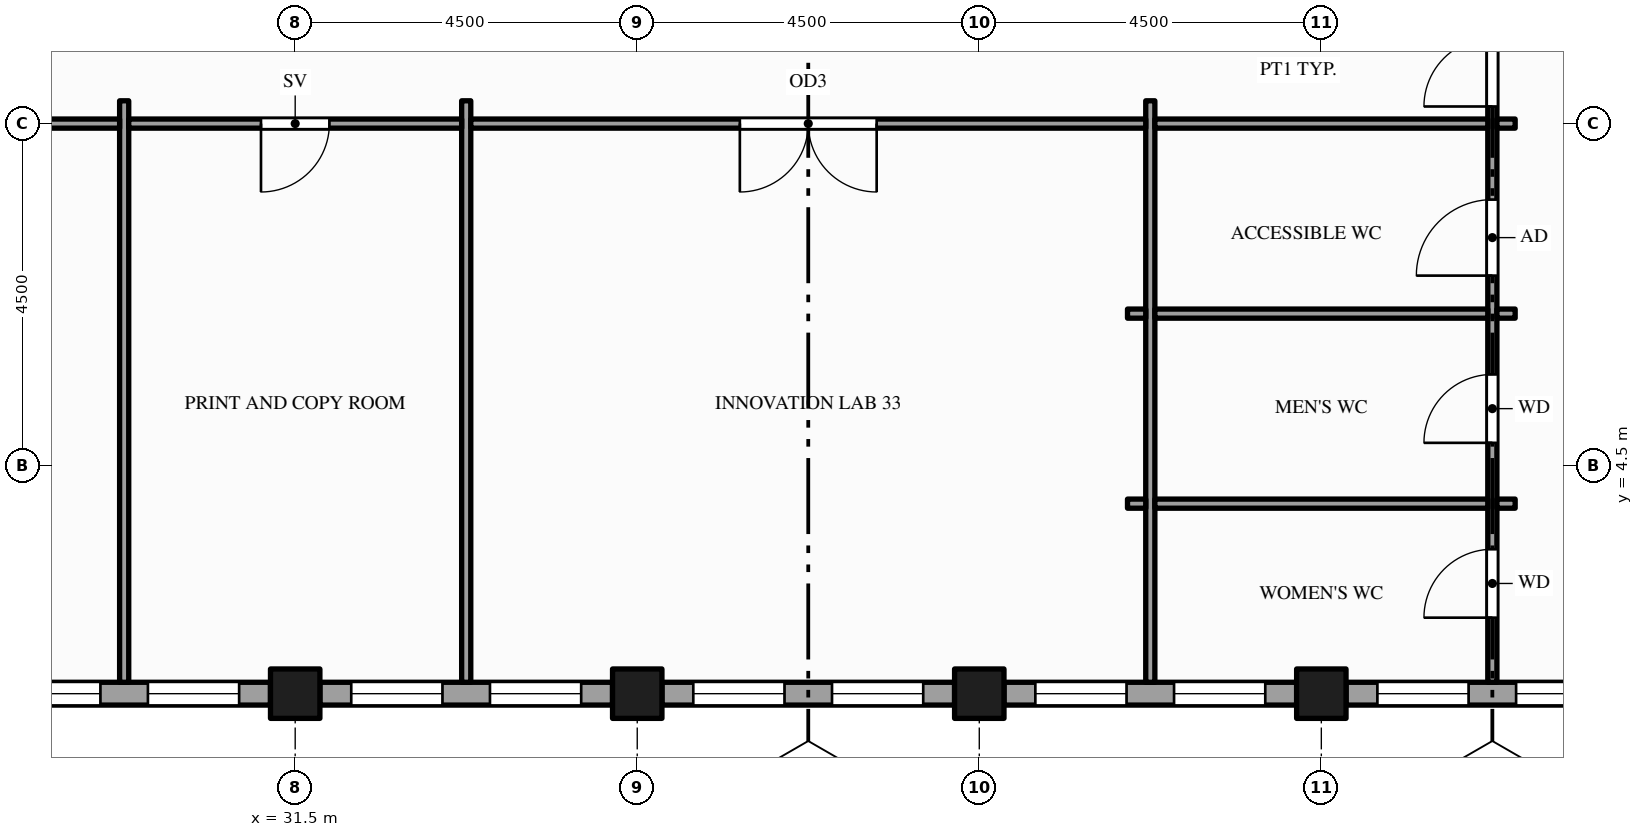
"""IFC4 building model, lengths in metres.
Left out: names, types, materials, properties, quantities, classifications, styles, units other than length and angle.
Written with IfcOpenShell. Run it as: python <this file> out.ifc"""

import sys

from ifc_helpers import new_model, si_unit, direction, frame, frame_2d, origin, origin_2d, place, context, subcontext, project, spatial, rectangle, hollow_rectangle, extrude, element, fill, save


model = new_model("IFC4")
c1 = context("Model", 3, precision=1e-05, world=origin(), true_north=direction((0.0, 1.0)))
c2 = subcontext(c1, "Body", "Model", "MODEL_VIEW")
j1 = project(units=[si_unit("LENGTHUNIT", "METRE"), si_unit("PLANEANGLEUNIT", "RADIAN")], contexts=[c1])
p1 = place(None, origin())
s1 = spatial("IfcSite", under=j1, at=p1, CompositionType="ELEMENT")
p2 = place(p1, origin())
s2 = spatial("IfcBuilding", under=s1, at=p2, CompositionType="ELEMENT")
p3 = place(p2, frame((0.0, 0.0, 289.0)))
s3 = spatial("IfcBuildingStorey", under=s2, at=p3, CompositionType="ELEMENT", Elevation=289.0)
for number, where, z_axis, x_axis in (
    (1, (31.5, 1.5, -0.15), (0.0, 0.0, 1.0), (1.0, 0.0, 0.0)),
    (2, (36.0, 1.5, -0.15), (0.0, 0.0, 1.0), (1.0, 0.0, 0.0)),
    (3, (40.5, 1.5, -0.15), (0.0, 0.0, 1.0), (1.0, 0.0, 0.0)),
    (4, (45.0, 1.5, -0.15), (0.0, 0.0, 1.0), (1.0, 0.0, 0.0)),
):
    element("IfcColumn", number, at=place(p3, frame(where, z_axis=z_axis, x_axis=x_axis)), inside=s3, PredefinedType="COLUMN", context=c2, shape_type="SweptSolid", body=[
        extrude(hollow_rectangle(XDim=0.65, YDim=0.65, WallThickness=0.032, at=origin_2d()), origin(), (0.0, 0.0, 1.0), 4.0),
    ])
p4 = place(p3, frame((27.325, 1.5, 0.0), z_axis=(0.0, 0.0, 1.0), x_axis=(1.0, 0.0, 0.0)))
e5 = element("IfcWall", 5, at=p4, inside=s3, PredefinedType="STANDARD", context=c2, shape_type="SweptSolid", body=[
    extrude(rectangle(XDim=3.85, YDim=0.3, at=frame_2d((1.925, 0.0))), origin(), (0.0, 0.0, 1.0), 2.87),
])
p5 = place(p4, frame((0.413, 0.0, 0.9)))
e6 = element("IfcOpeningElement", 6, at=p5, cuts=e5, PredefinedType="OPENING", context=c2, shape_type="SweptSolid", body=[
    extrude(rectangle(XDim=1.2, YDim=1.75, at=frame_2d((0.6, 0.875))), frame((0.0, 0.16, 0.0), z_axis=(0.0, -1.0, 0.0), x_axis=(1.0, 0.0, 0.0)), (0.0, 0.0, 1.0), 0.32),
])
p6 = place(p4, frame((2.238, 0.0, 0.9)))
e7 = element("IfcOpeningElement", 7, at=p6, cuts=e5, PredefinedType="OPENING", context=c2, shape_type="SweptSolid", body=[
    extrude(rectangle(XDim=1.2, YDim=1.75, at=frame_2d((0.6, 0.875))), frame((0.0, 0.16, 0.0), z_axis=(0.0, -1.0, 0.0), x_axis=(1.0, 0.0, 0.0)), (0.0, 0.0, 1.0), 0.32),
])
p7 = place(p3, frame((31.825, 1.5, 0.0), z_axis=(0.0, 0.0, 1.0), x_axis=(1.0, 0.0, 0.0)))
e8 = element("IfcWall", 8, at=p7, inside=s3, PredefinedType="STANDARD", context=c2, shape_type="SweptSolid", body=[
    extrude(rectangle(XDim=3.85, YDim=0.3, at=frame_2d((1.925, 0.0))), origin(), (0.0, 0.0, 1.0), 2.87),
])
p8 = place(p7, frame((0.413, 0.0, 0.9)))
e9 = element("IfcOpeningElement", 9, at=p8, cuts=e8, PredefinedType="OPENING", context=c2, shape_type="SweptSolid", body=[
    extrude(rectangle(XDim=1.2, YDim=1.75, at=frame_2d((0.6, 0.875))), frame((0.0, 0.16, 0.0), z_axis=(0.0, -1.0, 0.0), x_axis=(1.0, 0.0, 0.0)), (0.0, 0.0, 1.0), 0.32),
])
p9 = place(p7, frame((2.238, 0.0, 0.9)))
e10 = element("IfcOpeningElement", 10, at=p9, cuts=e8, PredefinedType="OPENING", context=c2, shape_type="SweptSolid", body=[
    extrude(rectangle(XDim=1.2, YDim=1.75, at=frame_2d((0.6, 0.875))), frame((0.0, 0.16, 0.0), z_axis=(0.0, -1.0, 0.0), x_axis=(1.0, 0.0, 0.0)), (0.0, 0.0, 1.0), 0.32),
])
p10 = place(p3, frame((36.325, 1.5, 0.0), z_axis=(0.0, 0.0, 1.0), x_axis=(1.0, 0.0, 0.0)))
e11 = element("IfcWall", 11, at=p10, inside=s3, PredefinedType="STANDARD", context=c2, shape_type="SweptSolid", body=[
    extrude(rectangle(XDim=3.85, YDim=0.3, at=frame_2d((1.925, 0.0))), origin(), (0.0, 0.0, 1.0), 2.87),
])
p11 = place(p10, frame((0.413, 0.0, 0.9)))
e12 = element("IfcOpeningElement", 12, at=p11, cuts=e11, PredefinedType="OPENING", context=c2, shape_type="SweptSolid", body=[
    extrude(rectangle(XDim=1.2, YDim=1.75, at=frame_2d((0.6, 0.875))), frame((0.0, 0.16, 0.0), z_axis=(0.0, -1.0, 0.0), x_axis=(1.0, 0.0, 0.0)), (0.0, 0.0, 1.0), 0.32),
])
p12 = place(p10, frame((2.238, 0.0, 0.9)))
e13 = element("IfcOpeningElement", 13, at=p12, cuts=e11, PredefinedType="OPENING", context=c2, shape_type="SweptSolid", body=[
    extrude(rectangle(XDim=1.2, YDim=1.75, at=frame_2d((0.6, 0.875))), frame((0.0, 0.16, 0.0), z_axis=(0.0, -1.0, 0.0), x_axis=(1.0, 0.0, 0.0)), (0.0, 0.0, 1.0), 0.32),
])
p13 = place(p3, frame((40.825, 1.5, 0.0), z_axis=(0.0, 0.0, 1.0), x_axis=(1.0, 0.0, 0.0)))
e14 = element("IfcWall", 14, at=p13, inside=s3, PredefinedType="STANDARD", context=c2, shape_type="SweptSolid", body=[
    extrude(rectangle(XDim=3.85, YDim=0.3, at=frame_2d((1.925, 0.0))), origin(), (0.0, 0.0, 1.0), 2.87),
])
p14 = place(p13, frame((0.413, 0.0, 0.9)))
e15 = element("IfcOpeningElement", 15, at=p14, cuts=e14, PredefinedType="OPENING", context=c2, shape_type="SweptSolid", body=[
    extrude(rectangle(XDim=1.2, YDim=1.75, at=frame_2d((0.6, 0.875))), frame((0.0, 0.16, 0.0), z_axis=(0.0, -1.0, 0.0), x_axis=(1.0, 0.0, 0.0)), (0.0, 0.0, 1.0), 0.32),
])
p15 = place(p13, frame((2.238, 0.0, 0.9)))
e16 = element("IfcOpeningElement", 16, at=p15, cuts=e14, PredefinedType="OPENING", context=c2, shape_type="SweptSolid", body=[
    extrude(rectangle(XDim=1.2, YDim=1.75, at=frame_2d((0.6, 0.875))), frame((0.0, 0.16, 0.0), z_axis=(0.0, -1.0, 0.0), x_axis=(1.0, 0.0, 0.0)), (0.0, 0.0, 1.0), 0.32),
])
p16 = place(p3, frame((45.325, 1.5, 0.0), z_axis=(0.0, 0.0, 1.0), x_axis=(1.0, 0.0, 0.0)))
e17 = element("IfcWall", 17, at=p16, inside=s3, PredefinedType="STANDARD", context=c2, shape_type="SweptSolid", body=[
    extrude(rectangle(XDim=3.85, YDim=0.3, at=frame_2d((1.925, 0.0))), origin(), (0.0, 0.0, 1.0), 2.87),
])
p17 = place(p16, frame((0.413, 0.0, 0.9)))
e18 = element("IfcOpeningElement", 18, at=p17, cuts=e17, PredefinedType="OPENING", context=c2, shape_type="SweptSolid", body=[
    extrude(rectangle(XDim=1.2, YDim=1.75, at=frame_2d((0.6, 0.875))), frame((0.0, 0.16, 0.0), z_axis=(0.0, -1.0, 0.0), x_axis=(1.0, 0.0, 0.0)), (0.0, 0.0, 1.0), 0.32),
])
p18 = place(p16, frame((2.238, 0.0, 0.9)))
e19 = element("IfcOpeningElement", 19, at=p18, cuts=e17, PredefinedType="OPENING", context=c2, shape_type="SweptSolid", body=[
    extrude(rectangle(XDim=1.2, YDim=1.75, at=frame_2d((0.6, 0.875))), frame((0.0, 0.16, 0.0), z_axis=(0.0, -1.0, 0.0), x_axis=(1.0, 0.0, 0.0)), (0.0, 0.0, 1.0), 0.32),
])
for number, where, z_axis, x_axis in (
    (20, (29.25, 1.65, 0.0), (0.0, 0.0, 1.0), (0.0, 1.0, 0.0)),
    (21, (33.75, 1.65, 0.0), (0.0, 0.0, 1.0), (0.0, 1.0, 0.0)),
    (22, (42.75, 1.65, 0.0), (0.0, 0.0, 1.0), (0.0, 1.0, 0.0)),
):
    element("IfcWall", number, at=place(p3, frame(where, z_axis=z_axis, x_axis=x_axis)), inside=s3, PredefinedType="PARTITIONING", context=c2, shape_type="SweptSolid", body=[
        extrude(rectangle(XDim=7.65, YDim=0.12, at=frame_2d((3.825, 0.0))), origin(), (0.0, 0.0, 1.0), 2.87),
    ])
p19 = place(p3, frame((47.25, 1.65, 0.0), z_axis=(0.0, 0.0, 1.0), x_axis=(0.0, 1.0, 0.0)))
e23 = element("IfcWall", 23, at=p19, inside=s3, PredefinedType="PARTITIONING", context=c2, shape_type="SweptSolid", body=[
    extrude(rectangle(XDim=22.2, YDim=0.12, at=frame_2d((11.1, 0.0))), origin(), (0.0, 0.0, 1.0), 2.87),
])
p20 = place(p19, frame((7.575, 0.0, 0.0)))
e24 = element("IfcOpeningElement", 24, at=p20, cuts=e23, PredefinedType="OPENING", context=c2, shape_type="SweptSolid", body=[
    extrude(rectangle(XDim=1.8, YDim=2.1, at=frame_2d((0.9, 1.05))), frame((0.0, 0.07, 0.0), z_axis=(0.0, -1.0, 0.0), x_axis=(1.0, 0.0, 0.0)), (0.0, 0.0, 1.0), 0.14),
])
p21 = place(p19, frame((0.85, 0.0, 0.0)))
e25 = element("IfcOpeningElement", 25, at=p21, cuts=e23, PredefinedType="OPENING", context=c2, shape_type="SweptSolid", body=[
    extrude(rectangle(XDim=0.9, YDim=2.1, at=frame_2d((0.45, 1.05))), frame((0.0, 0.07, 0.0), z_axis=(0.0, -1.0, 0.0), x_axis=(1.0, 0.0, 0.0)), (0.0, 0.0, 1.0), 0.14),
])
p22 = place(p19, frame((3.15, 0.0, 0.0)))
e26 = element("IfcOpeningElement", 26, at=p22, cuts=e23, PredefinedType="OPENING", context=c2, shape_type="SweptSolid", body=[
    extrude(rectangle(XDim=0.9, YDim=2.1, at=frame_2d((0.45, 1.05))), frame((0.0, 0.07, 0.0), z_axis=(0.0, -1.0, 0.0), x_axis=(1.0, 0.0, 0.0)), (0.0, 0.0, 1.0), 0.14),
])
p23 = place(p19, frame((5.35, 0.0, 0.0)))
e27 = element("IfcOpeningElement", 27, at=p23, cuts=e23, PredefinedType="OPENING", context=c2, shape_type="SweptSolid", body=[
    extrude(rectangle(XDim=1.0, YDim=2.1, at=frame_2d((0.5, 1.05))), frame((0.0, 0.07, 0.0), z_axis=(0.0, -1.0, 0.0), x_axis=(1.0, 0.0, 0.0)), (0.0, 0.0, 1.0), 0.14),
])
p24 = place(p3, frame((42.45, 4.0, 0.0), z_axis=(0.0, 0.0, 1.0), x_axis=(1.0, 0.0, 0.0)))
e28 = element("IfcWall", 28, at=p24, inside=s3, PredefinedType="PARTITIONING", context=c2, shape_type="SweptSolid", body=[
    extrude(rectangle(XDim=0.24, YDim=0.12, at=frame_2d((0.12, 0.0))), origin(), (0.0, 0.0, 1.0), 2.87),
])
p25 = place(p3, frame((42.81, 4.0, 0.0), z_axis=(0.0, 0.0, 1.0), x_axis=(1.0, 0.0, 0.0)))
e29 = element("IfcWall", 29, at=p25, inside=s3, PredefinedType="PARTITIONING", context=c2, shape_type="SweptSolid", body=[
    extrude(rectangle(XDim=4.38, YDim=0.12, at=frame_2d((2.19, 0.0))), origin(), (0.0, 0.0, 1.0), 2.87),
])
for number, where, z_axis, x_axis in (
    (30, (47.31, 4.0, 0.0), (0.0, 0.0, 1.0), (1.0, 0.0, 0.0)),
    (31, (42.45, 6.5, 0.0), (0.0, 0.0, 1.0), (1.0, 0.0, 0.0)),
):
    element("IfcWall", number, at=place(p3, frame(where, z_axis=z_axis, x_axis=x_axis)), inside=s3, PredefinedType="PARTITIONING", context=c2, shape_type="SweptSolid", body=[
        extrude(rectangle(XDim=0.24, YDim=0.12, at=frame_2d((0.12, 0.0))), origin(), (0.0, 0.0, 1.0), 2.87),
    ])
p26 = place(p3, frame((42.81, 6.5, 0.0), z_axis=(0.0, 0.0, 1.0), x_axis=(1.0, 0.0, 0.0)))
e32 = element("IfcWall", 32, at=p26, inside=s3, PredefinedType="PARTITIONING", context=c2, shape_type="SweptSolid", body=[
    extrude(rectangle(XDim=4.38, YDim=0.12, at=frame_2d((2.19, 0.0))), origin(), (0.0, 0.0, 1.0), 2.87),
])
p27 = place(p3, frame((47.31, 6.5, 0.0), z_axis=(0.0, 0.0, 1.0), x_axis=(1.0, 0.0, 0.0)))
e33 = element("IfcWall", 33, at=p27, inside=s3, PredefinedType="PARTITIONING", context=c2, shape_type="SweptSolid", body=[
    extrude(rectangle(XDim=0.24, YDim=0.12, at=frame_2d((0.12, 0.0))), origin(), (0.0, 0.0, 1.0), 2.87),
])
p28 = place(p3, frame((24.81, 9.0, 0.0), z_axis=(0.0, 0.0, 1.0), x_axis=(1.0, 0.0, 0.0)))
e34 = element("IfcWall", 34, at=p28, inside=s3, PredefinedType="PARTITIONING", context=c2, shape_type="SweptSolid", body=[
    extrude(rectangle(XDim=4.38, YDim=0.12, at=frame_2d((2.19, 0.0))), origin(), (0.0, 0.0, 1.0), 2.87),
])
p29 = place(p28, frame((1.59, 0.0, 0.0)))
e35 = element("IfcOpeningElement", 35, at=p29, cuts=e34, PredefinedType="OPENING", context=c2, shape_type="SweptSolid", body=[
    extrude(rectangle(XDim=1.2, YDim=2.1, at=frame_2d((0.6, 1.05))), frame((0.0, 0.07, 0.0), z_axis=(0.0, -1.0, 0.0), x_axis=(1.0, 0.0, 0.0)), (0.0, 0.0, 1.0), 0.14),
])
p30 = place(p3, frame((29.31, 9.0, 0.0), z_axis=(0.0, 0.0, 1.0), x_axis=(1.0, 0.0, 0.0)))
e36 = element("IfcWall", 36, at=p30, inside=s3, PredefinedType="PARTITIONING", context=c2, shape_type="SweptSolid", body=[
    extrude(rectangle(XDim=4.38, YDim=0.12, at=frame_2d((2.19, 0.0))), origin(), (0.0, 0.0, 1.0), 2.87),
])
p31 = place(p30, frame((1.74, 0.0, 0.0)))
e37 = element("IfcOpeningElement", 37, at=p31, cuts=e36, PredefinedType="OPENING", context=c2, shape_type="SweptSolid", body=[
    extrude(rectangle(XDim=0.9, YDim=2.1, at=frame_2d((0.45, 1.05))), frame((0.0, 0.07, 0.0), z_axis=(0.0, -1.0, 0.0), x_axis=(1.0, 0.0, 0.0)), (0.0, 0.0, 1.0), 0.14),
])
p32 = place(p3, frame((33.81, 9.0, 0.0), z_axis=(0.0, 0.0, 1.0), x_axis=(1.0, 0.0, 0.0)))
e38 = element("IfcWall", 38, at=p32, inside=s3, PredefinedType="PARTITIONING", context=c2, shape_type="SweptSolid", body=[
    extrude(rectangle(XDim=8.88, YDim=0.12, at=frame_2d((4.44, 0.0))), origin(), (0.0, 0.0, 1.0), 2.87),
])
p33 = place(p32, frame((3.54, 0.0, 0.0)))
e39 = element("IfcOpeningElement", 39, at=p33, cuts=e38, PredefinedType="OPENING", context=c2, shape_type="SweptSolid", body=[
    extrude(rectangle(XDim=1.8, YDim=2.1, at=frame_2d((0.9, 1.05))), frame((0.0, 0.07, 0.0), z_axis=(0.0, -1.0, 0.0), x_axis=(1.0, 0.0, 0.0)), (0.0, 0.0, 1.0), 0.14),
])
p34 = place(p3, frame((42.81, 9.0, 0.0), z_axis=(0.0, 0.0, 1.0), x_axis=(1.0, 0.0, 0.0)))
e40 = element("IfcWall", 40, at=p34, inside=s3, PredefinedType="PARTITIONING", context=c2, shape_type="SweptSolid", body=[
    extrude(rectangle(XDim=4.38, YDim=0.12, at=frame_2d((2.19, 0.0))), origin(), (0.0, 0.0, 1.0), 2.87),
])
p35 = place(p3, frame((47.31, 9.0, 0.0), z_axis=(0.0, 0.0, 1.0), x_axis=(1.0, 0.0, 0.0)))
e41 = element("IfcWall", 41, at=p35, inside=s3, PredefinedType="PARTITIONING", context=c2, shape_type="SweptSolid", body=[
    extrude(rectangle(XDim=0.24, YDim=0.12, at=frame_2d((0.12, 0.0))), origin(), (0.0, 0.0, 1.0), 2.87),
])
p36 = place(p5, origin())
e42 = element("IfcWindow", 42, at=p36, inside=s3, PartitioningType="SINGLE_PANEL", PredefinedType="WINDOW", context=c2, shape_type="SweptSolid", body=[
    extrude(rectangle(XDim=1.2, YDim=1.75, at=frame_2d((0.6, 0.875))), frame((0.0, 0.03, 0.0), z_axis=(0.0, -1.0, 0.0), x_axis=(1.0, 0.0, 0.0)), (0.0, 0.0, 1.0), 0.06),
])
fill(e6, e42)
p37 = place(p6, origin())
e43 = element("IfcWindow", 43, at=p37, inside=s3, PartitioningType="SINGLE_PANEL", PredefinedType="WINDOW", context=c2, shape_type="SweptSolid", body=[
    extrude(rectangle(XDim=1.2, YDim=1.75, at=frame_2d((0.6, 0.875))), frame((0.0, 0.03, 0.0), z_axis=(0.0, -1.0, 0.0), x_axis=(1.0, 0.0, 0.0)), (0.0, 0.0, 1.0), 0.06),
])
fill(e7, e43)
p38 = place(p8, origin())
e44 = element("IfcWindow", 44, at=p38, inside=s3, PartitioningType="SINGLE_PANEL", PredefinedType="WINDOW", context=c2, shape_type="SweptSolid", body=[
    extrude(rectangle(XDim=1.2, YDim=1.75, at=frame_2d((0.6, 0.875))), frame((0.0, 0.03, 0.0), z_axis=(0.0, -1.0, 0.0), x_axis=(1.0, 0.0, 0.0)), (0.0, 0.0, 1.0), 0.06),
])
fill(e9, e44)
p39 = place(p9, origin())
e45 = element("IfcWindow", 45, at=p39, inside=s3, PartitioningType="SINGLE_PANEL", PredefinedType="WINDOW", context=c2, shape_type="SweptSolid", body=[
    extrude(rectangle(XDim=1.2, YDim=1.75, at=frame_2d((0.6, 0.875))), frame((0.0, 0.03, 0.0), z_axis=(0.0, -1.0, 0.0), x_axis=(1.0, 0.0, 0.0)), (0.0, 0.0, 1.0), 0.06),
])
fill(e10, e45)
p40 = place(p11, origin())
e46 = element("IfcWindow", 46, at=p40, inside=s3, PartitioningType="SINGLE_PANEL", PredefinedType="WINDOW", context=c2, shape_type="SweptSolid", body=[
    extrude(rectangle(XDim=1.2, YDim=1.75, at=frame_2d((0.6, 0.875))), frame((0.0, 0.03, 0.0), z_axis=(0.0, -1.0, 0.0), x_axis=(1.0, 0.0, 0.0)), (0.0, 0.0, 1.0), 0.06),
])
fill(e12, e46)
p41 = place(p12, origin())
e47 = element("IfcWindow", 47, at=p41, inside=s3, PartitioningType="SINGLE_PANEL", PredefinedType="WINDOW", context=c2, shape_type="SweptSolid", body=[
    extrude(rectangle(XDim=1.2, YDim=1.75, at=frame_2d((0.6, 0.875))), frame((0.0, 0.03, 0.0), z_axis=(0.0, -1.0, 0.0), x_axis=(1.0, 0.0, 0.0)), (0.0, 0.0, 1.0), 0.06),
])
fill(e13, e47)
p42 = place(p14, origin())
e48 = element("IfcWindow", 48, at=p42, inside=s3, PartitioningType="SINGLE_PANEL", PredefinedType="WINDOW", context=c2, shape_type="SweptSolid", body=[
    extrude(rectangle(XDim=1.2, YDim=1.75, at=frame_2d((0.6, 0.875))), frame((0.0, 0.03, 0.0), z_axis=(0.0, -1.0, 0.0), x_axis=(1.0, 0.0, 0.0)), (0.0, 0.0, 1.0), 0.06),
])
fill(e15, e48)
p43 = place(p15, origin())
e49 = element("IfcWindow", 49, at=p43, inside=s3, PartitioningType="SINGLE_PANEL", PredefinedType="WINDOW", context=c2, shape_type="SweptSolid", body=[
    extrude(rectangle(XDim=1.2, YDim=1.75, at=frame_2d((0.6, 0.875))), frame((0.0, 0.03, 0.0), z_axis=(0.0, -1.0, 0.0), x_axis=(1.0, 0.0, 0.0)), (0.0, 0.0, 1.0), 0.06),
])
fill(e16, e49)
p44 = place(p17, origin())
e50 = element("IfcWindow", 50, at=p44, inside=s3, PartitioningType="SINGLE_PANEL", PredefinedType="WINDOW", context=c2, shape_type="SweptSolid", body=[
    extrude(rectangle(XDim=1.2, YDim=1.75, at=frame_2d((0.6, 0.875))), frame((0.0, 0.03, 0.0), z_axis=(0.0, -1.0, 0.0), x_axis=(1.0, 0.0, 0.0)), (0.0, 0.0, 1.0), 0.06),
])
fill(e18, e50)
p45 = place(p18, origin())
e51 = element("IfcWindow", 51, at=p45, inside=s3, PartitioningType="SINGLE_PANEL", PredefinedType="WINDOW", context=c2, shape_type="SweptSolid", body=[
    extrude(rectangle(XDim=1.2, YDim=1.75, at=frame_2d((0.6, 0.875))), frame((0.0, 0.03, 0.0), z_axis=(0.0, -1.0, 0.0), x_axis=(1.0, 0.0, 0.0)), (0.0, 0.0, 1.0), 0.06),
])
fill(e19, e51)
p46 = place(p20, origin())
e52 = element("IfcDoor", 52, at=p46, inside=s3, OperationType="DOUBLE_DOOR_SINGLE_SWING", PredefinedType="DOOR", context=c2, shape_type="SweptSolid", body=[
    extrude(rectangle(XDim=1.8, YDim=2.1, at=frame_2d((0.9, 1.05))), frame((0.0, 0.025, 0.0), z_axis=(0.0, -1.0, 0.0), x_axis=(1.0, 0.0, 0.0)), (0.0, 0.0, 1.0), 0.05),
])
fill(e24, e52)
p47 = place(p31, origin())
e53 = element("IfcDoor", 53, at=p47, inside=s3, OperationType="SINGLE_SWING_LEFT", PredefinedType="DOOR", context=c2, shape_type="SweptSolid", body=[
    extrude(rectangle(XDim=0.9, YDim=2.1, at=frame_2d((0.45, 1.05))), frame((0.0, 0.025, 0.0), z_axis=(0.0, -1.0, 0.0), x_axis=(1.0, 0.0, 0.0)), (0.0, 0.0, 1.0), 0.05),
])
fill(e37, e53)
p48 = place(p33, origin())
e54 = element("IfcDoor", 54, at=p48, inside=s3, OperationType="DOUBLE_DOOR_SINGLE_SWING", PredefinedType="DOOR", context=c2, shape_type="SweptSolid", body=[
    extrude(rectangle(XDim=1.8, YDim=2.1, at=frame_2d((0.9, 1.05))), frame((0.0, 0.025, 0.0), z_axis=(0.0, -1.0, 0.0), x_axis=(1.0, 0.0, 0.0)), (0.0, 0.0, 1.0), 0.05),
])
fill(e39, e54)
p49 = place(p21, origin())
e55 = element("IfcDoor", 55, at=p49, inside=s3, OperationType="SINGLE_SWING_LEFT", PredefinedType="DOOR", context=c2, shape_type="SweptSolid", body=[
    extrude(rectangle(XDim=0.9, YDim=2.1, at=frame_2d((0.45, 1.05))), frame((0.0, 0.025, 0.0), z_axis=(0.0, -1.0, 0.0), x_axis=(1.0, 0.0, 0.0)), (0.0, 0.0, 1.0), 0.05),
])
fill(e25, e55)
p50 = place(p22, origin())
e56 = element("IfcDoor", 56, at=p50, inside=s3, OperationType="SINGLE_SWING_LEFT", PredefinedType="DOOR", context=c2, shape_type="SweptSolid", body=[
    extrude(rectangle(XDim=0.9, YDim=2.1, at=frame_2d((0.45, 1.05))), frame((0.0, 0.025, 0.0), z_axis=(0.0, -1.0, 0.0), x_axis=(1.0, 0.0, 0.0)), (0.0, 0.0, 1.0), 0.05),
])
fill(e26, e56)
p51 = place(p23, origin())
e57 = element("IfcDoor", 57, at=p51, inside=s3, OperationType="SINGLE_SWING_LEFT", PredefinedType="DOOR", context=c2, shape_type="SweptSolid", body=[
    extrude(rectangle(XDim=1.0, YDim=2.1, at=frame_2d((0.5, 1.05))), frame((0.0, 0.025, 0.0), z_axis=(0.0, -1.0, 0.0), x_axis=(1.0, 0.0, 0.0)), (0.0, 0.0, 1.0), 0.05),
])
fill(e27, e57)
save(model, sys.argv[1])
